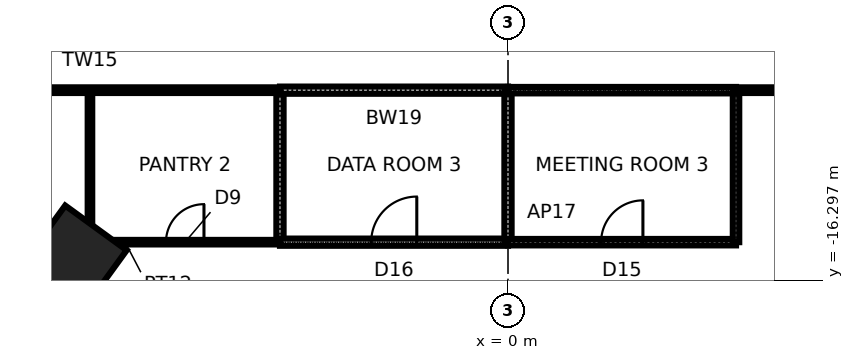
"""IFC4 building model, lengths in metres.
Left out: names, types, materials, properties, quantities, classifications, styles, units other than length and angle.
Written with IfcOpenShell. Run it as: python <this file> out.ifc"""

import sys

from ifc_helpers import new_model, si_unit, direction, frame, frame_2d, origin, origin_2d, place, context, subcontext, project, spatial, rectangle, extrude, element, fill, save


model = new_model("IFC4")
c1 = context("Model", 3, precision=1e-05, world=origin(), true_north=direction((0.0, 1.0)))
c2 = subcontext(c1, "Body", "Model", "MODEL_VIEW")
j1 = project(units=[si_unit("LENGTHUNIT", "METRE"), si_unit("PLANEANGLEUNIT", "RADIAN")], contexts=[c1])
p1 = place(None, origin())
s1 = spatial("IfcSite", under=j1, at=p1, CompositionType="ELEMENT")
p2 = place(p1, origin())
s2 = spatial("IfcBuilding", under=s1, at=p2, CompositionType="ELEMENT")
p3 = place(p2, frame((0.0, 0.0, 44.8)))
s3 = spatial("IfcBuildingStorey", under=s2, at=p3, CompositionType="ELEMENT", Elevation=44.8)
p4 = place(p3, frame((-11.43, -15.733, 0.0), z_axis=(0.0, 0.0, 1.0), x_axis=(-0.587785252292, -0.809016994375, 0.0)))
e1 = element("IfcColumn", 1, at=p4, inside=s3, PredefinedType="COLUMN", context=c2, shape_type="SweptSolid", body=[
    extrude(rectangle(XDim=2.0, YDim=2.0, at=origin_2d()), origin(), (0.0, 0.0, 1.0), 4.2),
])
p5 = place(p3, frame((-16.0, -11.3, 0.0), z_axis=(0.0, 0.0, 1.0), x_axis=(1.0, 0.0, 0.0)))
e2 = element("IfcWall", 2, at=p5, inside=s3, PredefinedType="PARTITIONING", context=c2, shape_type="SweptSolid", body=[
    extrude(rectangle(XDim=10.0, YDim=0.15, at=frame_2d((5.0, 0.0))), origin(), (0.0, 0.0, 1.0), 4.04),
])
p6 = place(p3, frame((-11.0, -11.3, 0.0), z_axis=(0.0, 0.0, 1.0), x_axis=(0.0, -1.0, 0.0)))
e3 = element("IfcWall", 3, at=p6, inside=s3, PredefinedType="PARTITIONING", context=c2, shape_type="SweptSolid", body=[
    extrude(rectangle(XDim=4.0, YDim=0.12, at=frame_2d((2.0, 0.0))), origin(), (0.0, 0.0, 1.0), 4.04),
])
p7 = place(p3, frame((-11.0, -15.3, 0.0), z_axis=(0.0, 0.0, 1.0), x_axis=(1.0, 0.0, 0.0)))
e4 = element("IfcWall", 4, at=p7, inside=s3, PredefinedType="PARTITIONING", context=c2, shape_type="SweptSolid", body=[
    extrude(rectangle(XDim=5.0, YDim=0.12, at=frame_2d((2.5, 0.0))), origin(), (0.0, 0.0, 1.0), 4.04),
])
p8 = place(p7, frame((2.0, 0.0, 0.0)))
e5 = element("IfcOpeningElement", 5, at=p8, cuts=e4, PredefinedType="OPENING", context=c2, shape_type="SweptSolid", body=[
    extrude(rectangle(XDim=1.0, YDim=2.4, at=frame_2d((0.5, 1.2))), frame((0.0, 0.07, 0.0), z_axis=(0.0, -1.0, 0.0), x_axis=(1.0, 0.0, 0.0)), (0.0, 0.0, 1.0), 0.14),
])
p9 = place(p3, frame((-6.0, -15.3, 0.0), z_axis=(0.0, 0.0, 1.0), x_axis=(0.0, 1.0, 0.0)))
e6 = element("IfcWall", 6, at=p9, inside=s3, PredefinedType="SOLIDWALL", context=c2, shape_type="SweptSolid", body=[
    extrude(rectangle(XDim=4.0, YDim=0.19, at=frame_2d((2.0, 0.0))), origin(), (0.0, 0.0, 1.0), 4.04),
])
p10 = place(p3, frame((0.0, -11.3, 0.0), z_axis=(0.0, 0.0, 1.0), x_axis=(-1.0, 0.0, 0.0)))
e7 = element("IfcWall", 7, at=p10, inside=s3, PredefinedType="SOLIDWALL", context=c2, shape_type="SweptSolid", body=[
    extrude(rectangle(XDim=6.0, YDim=0.19, at=frame_2d((3.0, 0.0))), origin(), (0.0, 0.0, 1.0), 4.04),
])
p11 = place(p3, frame((-6.0, -15.3, 0.0), z_axis=(0.0, 0.0, 1.0), x_axis=(1.0, 0.0, 0.0)))
e8 = element("IfcWall", 8, at=p11, inside=s3, PredefinedType="SOLIDWALL", context=c2, shape_type="SweptSolid", body=[
    extrude(rectangle(XDim=6.0, YDim=0.19, at=frame_2d((3.0, 0.0))), origin(), (0.0, 0.0, 1.0), 3.586),
])
p12 = place(p11, frame((2.4, 0.0, 0.0)))
e9 = element("IfcOpeningElement", 9, at=p12, cuts=e8, PredefinedType="OPENING", context=c2, shape_type="SweptSolid", body=[
    extrude(rectangle(XDim=1.2, YDim=2.1, at=frame_2d((0.6, 1.05))), frame((0.0, 0.105, 0.0), z_axis=(0.0, -1.0, 0.0), x_axis=(1.0, 0.0, 0.0)), (0.0, 0.0, 1.0), 0.21),
])
p13 = place(p3, frame((0.0, -11.3, 0.0), z_axis=(0.0, 0.0, 1.0), x_axis=(0.0, -1.0, 0.0)))
e10 = element("IfcWall", 10, at=p13, inside=s3, PredefinedType="SOLIDWALL", context=c2, shape_type="SweptSolid", body=[
    extrude(rectangle(XDim=4.0, YDim=0.19, at=frame_2d((2.0, 0.0))), origin(), (0.0, 0.0, 1.0), 2.84),
])
p14 = place(p3, frame((0.0, -15.3, 0.0), z_axis=(0.0, 0.0, 1.0), x_axis=(1.0, 0.0, 0.0)))
e11 = element("IfcWall", 11, at=p14, inside=s3, PredefinedType="PARTITIONING", context=c2, shape_type="SweptSolid", body=[
    extrude(rectangle(XDim=6.0, YDim=0.17, at=frame_2d((3.0, 0.0))), origin(), (0.0, 0.0, 1.0), 3.586),
])
p15 = place(p14, frame((2.45, 0.0, 0.0)))
e12 = element("IfcOpeningElement", 12, at=p15, cuts=e11, PredefinedType="OPENING", context=c2, shape_type="SweptSolid", body=[
    extrude(rectangle(XDim=1.1, YDim=2.4, at=frame_2d((0.55, 1.2))), frame((0.0, 0.095, 0.0), z_axis=(0.0, -1.0, 0.0), x_axis=(1.0, 0.0, 0.0)), (0.0, 0.0, 1.0), 0.19),
])
p16 = place(p3, frame((6.0, -11.3, 0.0), z_axis=(0.0, 0.0, 1.0), x_axis=(-1.0, 0.0, 0.0)))
e13 = element("IfcWall", 13, at=p16, inside=s3, PredefinedType="PARTITIONING", context=c2, shape_type="SweptSolid", body=[
    extrude(rectangle(XDim=6.0, YDim=0.17, at=frame_2d((3.0, 0.0))), origin(), (0.0, 0.0, 1.0), 4.04),
])
p17 = place(p3, frame((6.0, -15.3, 0.0), z_axis=(0.0, 0.0, 1.0), x_axis=(0.0, 1.0, 0.0)))
e14 = element("IfcWall", 14, at=p17, inside=s3, PredefinedType="PARTITIONING", context=c2, shape_type="SweptSolid", body=[
    extrude(rectangle(XDim=4.0, YDim=0.17, at=frame_2d((2.0, 0.0))), origin(), (0.0, 0.0, 1.0), 4.04),
])
p18 = place(p3, frame((6.0, -11.3, 0.0), z_axis=(0.0, 0.0, 1.0), x_axis=(1.0, 0.0, 0.0)))
e15 = element("IfcWall", 15, at=p18, inside=s3, PredefinedType="PARTITIONING", context=c2, shape_type="SweptSolid", body=[
    extrude(rectangle(XDim=10.0, YDim=0.15, at=frame_2d((5.0, 0.0))), origin(), (0.0, 0.0, 1.0), 4.04),
])
p19 = place(p12, origin())
e16 = element("IfcDoor", 16, at=p19, inside=s3, OperationType="SINGLE_SWING_RIGHT", PredefinedType="DOOR", context=c2, shape_type="SweptSolid", body=[
    extrude(rectangle(XDim=1.2, YDim=2.1, at=frame_2d((0.6, 1.05))), frame((0.0, 0.025, 0.0), z_axis=(0.0, -1.0, 0.0), x_axis=(1.0, 0.0, 0.0)), (0.0, 0.0, 1.0), 0.05),
])
fill(e9, e16)
p20 = place(p15, origin())
e17 = element("IfcDoor", 17, at=p20, inside=s3, OperationType="SINGLE_SWING_RIGHT", PredefinedType="DOOR", context=c2, shape_type="SweptSolid", body=[
    extrude(rectangle(XDim=1.1, YDim=2.4, at=frame_2d((0.55, 1.2))), frame((0.0, 0.025, 0.0), z_axis=(0.0, -1.0, 0.0), x_axis=(1.0, 0.0, 0.0)), (0.0, 0.0, 1.0), 0.05),
])
fill(e12, e17)
p21 = place(p8, origin())
e18 = element("IfcDoor", 18, at=p21, inside=s3, OperationType="SINGLE_SWING_RIGHT", PredefinedType="DOOR", context=c2, shape_type="SweptSolid", body=[
    extrude(rectangle(XDim=1.0, YDim=2.4, at=frame_2d((0.5, 1.2))), frame((0.0, 0.025, 0.0), z_axis=(0.0, -1.0, 0.0), x_axis=(1.0, 0.0, 0.0)), (0.0, 0.0, 1.0), 0.05),
])
fill(e5, e18)
save(model, sys.argv[1])
